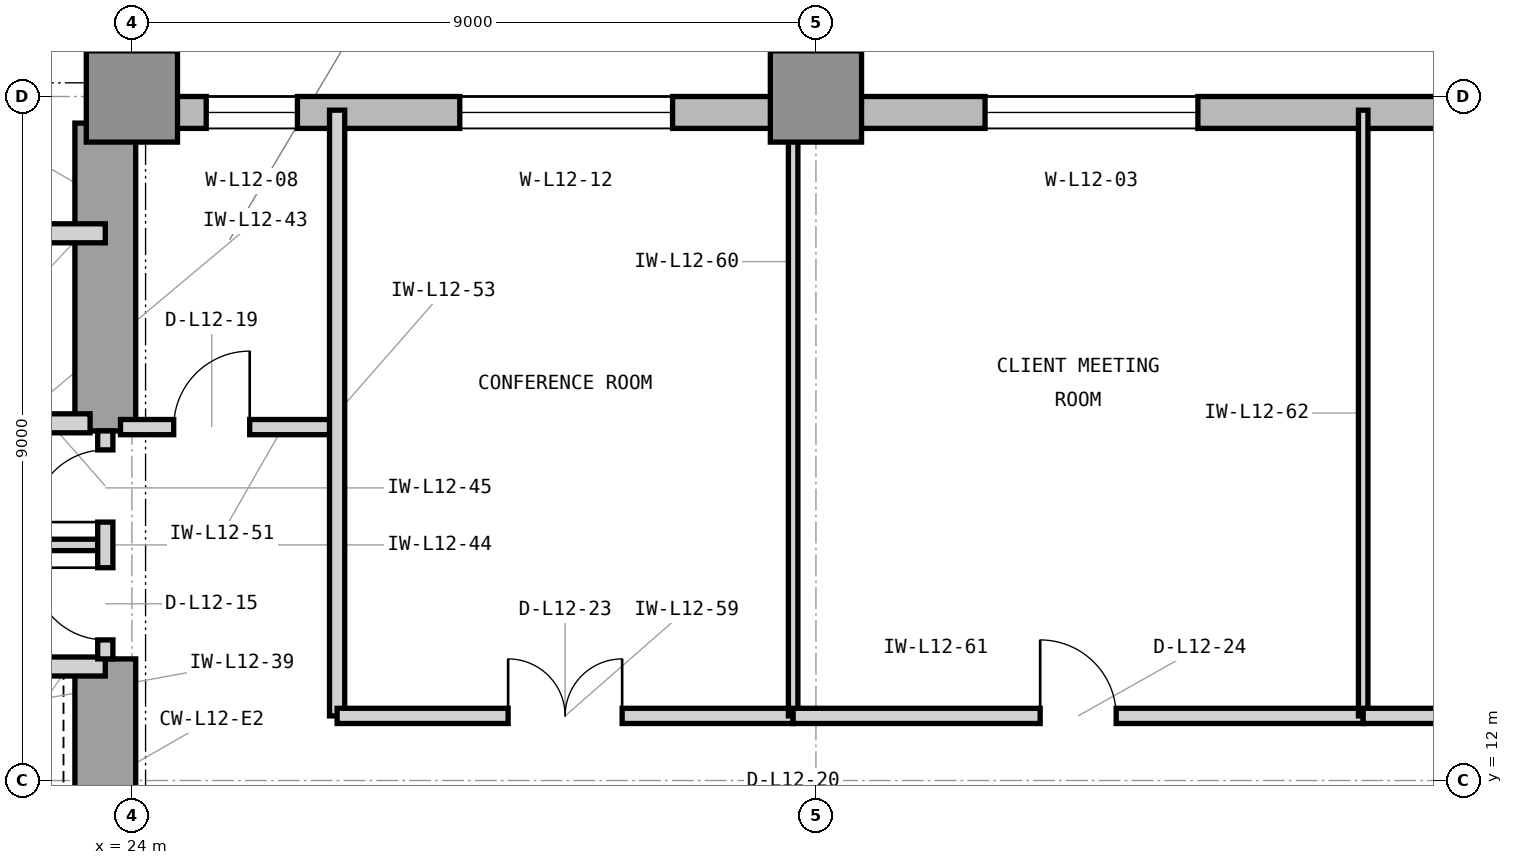
"""IFC4 building model, lengths in metres.
Left out: names, types, materials, properties, quantities, classifications, styles, units other than length and angle.
Written with IfcOpenShell. Run it as: python <this file> out.ifc"""

import sys

from ifc_helpers import new_model, si_unit, direction, frame, frame_2d, origin, origin_2d, place, context, subcontext, project, spatial, rectangle, extrude, element, fill, save


model = new_model("IFC4")
c1 = context("Model", 3, precision=1e-05, world=origin(), true_north=direction((0.0, 1.0)))
c2 = subcontext(c1, "Body", "Model", "MODEL_VIEW")
j1 = project(units=[si_unit("LENGTHUNIT", "METRE"), si_unit("PLANEANGLEUNIT", "RADIAN")], contexts=[c1])
p1 = place(None, origin())
s1 = spatial("IfcSite", under=j1, at=p1, CompositionType="ELEMENT")
p2 = place(p1, origin())
s2 = spatial("IfcBuilding", under=s1, at=p2, CompositionType="ELEMENT")
p3 = place(p2, frame((0.0, 0.0, 55.2)))
s3 = spatial("IfcBuildingStorey", under=s2, at=p3, CompositionType="ELEMENT", Elevation=55.2)
p4 = place(p3, frame((23.65, 10.4, 0.0), z_axis=(0.0, 0.0, 1.0), x_axis=(0.0, 1.0, 0.0)))
e1 = element("IfcWall", 1, at=p4, inside=s3, PredefinedType="SHEAR", context=c2, shape_type="SweptSolid", body=[
    extrude(rectangle(XDim=3.2, YDim=0.8, at=frame_2d((1.6, 0.0))), origin(), (0.0, 0.0, 1.0), 4.2),
])
p5 = place(p3, frame((23.65, 16.6, 0.0), z_axis=(0.0, 0.0, 1.0), x_axis=(0.0, 1.0, 0.0)))
e2 = element("IfcWall", 2, at=p5, inside=s3, PredefinedType="SHEAR", context=c2, shape_type="SweptSolid", body=[
    extrude(rectangle(XDim=4.05, YDim=0.8, at=frame_2d((2.025, 0.0))), origin(), (0.0, 0.0, 1.0), 4.2),
])
for number, where, z_axis, x_axis in (
    (3, (24.0, 21.0, 0.0), (0.0, 0.0, 1.0), (1.0, 0.0, 0.0)),
    (4, (33.0, 21.0, 0.0), (0.0, 0.0, 1.0), (1.0, 0.0, 0.0)),
):
    element("IfcColumn", number, at=place(p3, frame(where, z_axis=z_axis, x_axis=x_axis)), inside=s3, PredefinedType="COLUMN", context=c2, shape_type="SweptSolid", body=[
        extrude(rectangle(XDim=1.2, YDim=1.2, at=origin_2d()), origin(), (0.0, 0.0, 1.0), 4.2),
    ])
p6 = place(p3, frame((64.4, 20.79, 0.0), z_axis=(0.0, 0.0, 1.0), x_axis=(-1.0, 0.0, 0.0)))
e5 = element("IfcWall", 5, at=p6, inside=s3, PredefinedType="STANDARD", context=c2, shape_type="SweptSolid", body=[
    extrude(rectangle(XDim=40.4, YDim=0.42, at=frame_2d((20.2, 0.0))), origin(), (0.0, 0.0, 1.0), 3.98),
])
p7 = place(p6, frame((26.375, 0.0, 0.85)))
e6 = element("IfcOpeningElement", 6, at=p7, cuts=e5, PredefinedType="OPENING", context=c2, shape_type="SweptSolid", body=[
    extrude(rectangle(XDim=2.8, YDim=2.45, at=frame_2d((1.4, 1.225))), frame((0.0, 0.22, 0.0), z_axis=(0.0, -1.0, 0.0), x_axis=(1.0, 0.0, 0.0)), (0.0, 0.0, 1.0), 0.44),
])
p8 = place(p6, frame((38.222, 0.0, 0.85)))
e7 = element("IfcOpeningElement", 7, at=p8, cuts=e5, PredefinedType="OPENING", context=c2, shape_type="SweptSolid", body=[
    extrude(rectangle(XDim=1.2, YDim=2.45, at=frame_2d((0.6, 1.225))), frame((0.0, 0.22, 0.0), z_axis=(0.0, -1.0, 0.0), x_axis=(1.0, 0.0, 0.0)), (0.0, 0.0, 1.0), 0.44),
])
p9 = place(p6, frame((33.286, 0.0, 0.85)))
e8 = element("IfcOpeningElement", 8, at=p9, cuts=e5, PredefinedType="OPENING", context=c2, shape_type="SweptSolid", body=[
    extrude(rectangle(XDim=2.8, YDim=2.45, at=frame_2d((1.4, 1.225))), frame((0.0, 0.22, 0.0), z_axis=(0.0, -1.0, 0.0), x_axis=(1.0, 0.0, 0.0)), (0.0, 0.0, 1.0), 0.44),
])
p10 = place(p6, frame((18.636, 0.0, 0.85)))
e9 = element("IfcOpeningElement", 9, at=p10, cuts=e5, PredefinedType="OPENING", context=c2, shape_type="SweptSolid", body=[
    extrude(rectangle(XDim=2.8, YDim=2.45, at=frame_2d((1.4, 1.225))), frame((0.0, 0.22, 0.0), z_axis=(0.0, -1.0, 0.0), x_axis=(1.0, 0.0, 0.0)), (0.0, 0.0, 1.0), 0.44),
])
p11 = place(p6, frame((11.436, 0.0, 0.85)))
e10 = element("IfcOpeningElement", 10, at=p11, cuts=e5, PredefinedType="OPENING", context=c2, shape_type="SweptSolid", body=[
    extrude(rectangle(XDim=1.2, YDim=2.45, at=frame_2d((0.6, 1.225))), frame((0.0, 0.22, 0.0), z_axis=(0.0, -1.0, 0.0), x_axis=(1.0, 0.0, 0.0)), (0.0, 0.0, 1.0), 0.44),
])
p12 = place(p3, frame((23.79, 21.0, 0.0), z_axis=(0.0, 0.0, 1.0), x_axis=(0.0, 1.0, 0.0)))
e11 = element("IfcWall", 11, at=p12, inside=s3, PredefinedType="STANDARD", context=c2, shape_type="SweptSolid", body=[
    extrude(rectangle(XDim=28.4, YDim=0.42, at=frame_2d((14.2, 0.0))), origin(), (0.0, 0.0, 1.0), 3.98),
])
p13 = place(p12, frame((10.433, 0.0, 0.85)))
e12 = element("IfcOpeningElement", 12, at=p13, cuts=e11, PredefinedType="OPENING", context=c2, shape_type="SweptSolid", body=[
    extrude(rectangle(XDim=2.8, YDim=2.45, at=frame_2d((1.4, 1.225))), frame((0.0, 0.22, 0.0), z_axis=(0.0, -1.0, 0.0), x_axis=(1.0, 0.0, 0.0)), (0.0, 0.0, 1.0), 0.44),
])
p14 = place(p3, frame((21.05, 16.7, 0.0), z_axis=(0.0, 0.0, 1.0), x_axis=(1.0, 0.0, 0.0)))
e13 = element("IfcWall", 13, at=p14, inside=s3, PredefinedType="PARTITIONING", context=c2, shape_type="SweptSolid", body=[
    extrude(rectangle(XDim=2.4, YDim=0.25, at=frame_2d((1.2, 0.0))), origin(), (0.0, 0.0, 1.0), 3.426),
])
p15 = place(p3, frame((16.45, 19.2, 0.0), z_axis=(0.0, 0.0, 1.0), x_axis=(1.0, 0.0, 0.0)))
e14 = element("IfcWall", 14, at=p15, inside=s3, PredefinedType="PARTITIONING", context=c2, shape_type="SweptSolid", body=[
    extrude(rectangle(XDim=7.2, YDim=0.25, at=frame_2d((3.6, 0.0))), origin(), (0.0, 0.0, 1.0), 3.97),
])
p16 = place(p3, frame((14.7, 13.5, 0.0), z_axis=(0.0, 0.0, 1.0), x_axis=(1.0, 0.0, 0.0)))
e15 = element("IfcWall", 15, at=p16, inside=s3, PredefinedType="PARTITIONING", context=c2, shape_type="SweptSolid", body=[
    extrude(rectangle(XDim=8.95, YDim=0.25, at=frame_2d((4.475, 0.0))), origin(), (0.0, 0.0, 1.0), 3.426),
])
p17 = place(p3, frame((19.65, 15.1, 0.0), z_axis=(0.0, 0.0, 1.0), x_axis=(1.0, 0.0, 0.0)))
e16 = element("IfcWall", 16, at=p17, inside=s3, PredefinedType="PARTITIONING", context=c2, shape_type="SweptSolid", body=[
    extrude(rectangle(XDim=4.0, YDim=0.15, at=frame_2d((2.0, 0.0))), origin(), (0.0, 0.0, 1.0), 3.97),
])
p18 = place(p3, frame((23.65, 13.6, 0.0), z_axis=(0.0, 0.0, 1.0), x_axis=(0.0, 1.0, 0.0)))
e17 = element("IfcWall", 17, at=p18, inside=s3, PredefinedType="PARTITIONING", context=c2, shape_type="SweptSolid", body=[
    extrude(rectangle(XDim=3.0, YDim=0.2, at=frame_2d((1.5, 0.0))), origin(), (0.0, 0.0, 1.0), 3.97),
])
p19 = place(p18, frame((0.25, 0.0, 0.0)))
e18 = element("IfcOpeningElement", 18, at=p19, cuts=e17, PredefinedType="OPENING", context=c2, shape_type="SweptSolid", body=[
    extrude(rectangle(XDim=0.95, YDim=2.1, at=frame_2d((0.475, 1.05))), frame((0.0, 0.11, 0.0), z_axis=(0.0, -1.0, 0.0), x_axis=(1.0, 0.0, 0.0)), (0.0, 0.0, 1.0), 0.22),
])
p20 = place(p18, frame((1.8, 0.0, 0.0)))
e19 = element("IfcOpeningElement", 19, at=p20, cuts=e17, PredefinedType="OPENING", context=c2, shape_type="SweptSolid", body=[
    extrude(rectangle(XDim=0.95, YDim=2.1, at=frame_2d((0.475, 1.05))), frame((0.0, 0.11, 0.0), z_axis=(0.0, -1.0, 0.0), x_axis=(1.0, 0.0, 0.0)), (0.0, 0.0, 1.0), 0.22),
])
p21 = place(p3, frame((23.85, 16.65, 0.0), z_axis=(0.0, 0.0, 1.0), x_axis=(1.0, 0.0, 0.0)))
e20 = element("IfcWall", 20, at=p21, inside=s3, PredefinedType="PARTITIONING", context=c2, shape_type="SweptSolid", body=[
    extrude(rectangle(XDim=2.85, YDim=0.2, at=frame_2d((1.425, 0.0))), origin(), (0.0, 0.0, 1.0), 3.97),
])
p22 = place(p21, frame((0.7, 0.0, 0.0)))
e21 = element("IfcOpeningElement", 21, at=p22, cuts=e20, PredefinedType="OPENING", context=c2, shape_type="SweptSolid", body=[
    extrude(rectangle(XDim=1.0, YDim=2.15, at=frame_2d((0.5, 1.075))), frame((0.0, 0.11, 0.0), z_axis=(0.0, -1.0, 0.0), x_axis=(1.0, 0.0, 0.0)), (0.0, 0.0, 1.0), 0.22),
])
p23 = place(p3, frame((26.7, 12.85, 0.0), z_axis=(0.0, 0.0, 1.0), x_axis=(0.0, 1.0, 0.0)))
e22 = element("IfcWall", 22, at=p23, inside=s3, PredefinedType="PARTITIONING", context=c2, shape_type="SweptSolid", body=[
    extrude(rectangle(XDim=7.97, YDim=0.2, at=frame_2d((3.985, 0.0))), origin(), (0.0, 0.0, 1.0), 3.97),
])
p24 = place(p3, frame((26.7, 12.85, 0.0), z_axis=(0.0, 0.0, 1.0), x_axis=(1.0, 0.0, 0.0)))
e23 = element("IfcWall", 23, at=p24, inside=s3, PredefinedType="PARTITIONING", context=c2, shape_type="SweptSolid", body=[
    extrude(rectangle(XDim=6.0, YDim=0.2, at=frame_2d((3.0, 0.0))), origin(), (0.0, 0.0, 1.0), 3.97),
])
p25 = place(p24, frame((2.25, 0.0, 0.0)))
e24 = element("IfcOpeningElement", 24, at=p25, cuts=e23, PredefinedType="OPENING", context=c2, shape_type="SweptSolid", body=[
    extrude(rectangle(XDim=1.5, YDim=2.3, at=frame_2d((0.75, 1.15))), frame((0.0, 0.11, 0.0), z_axis=(0.0, -1.0, 0.0), x_axis=(1.0, 0.0, 0.0)), (0.0, 0.0, 1.0), 0.22),
])
p26 = place(p3, frame((32.7, 12.85, 0.0), z_axis=(0.0, 0.0, 1.0), x_axis=(0.0, 1.0, 0.0)))
e25 = element("IfcWall", 25, at=p26, inside=s3, PredefinedType="PARTITIONING", context=c2, shape_type="SweptSolid", body=[
    extrude(rectangle(XDim=7.97, YDim=0.125, at=frame_2d((3.985, 0.0))), origin(), (0.0, 0.0, 1.0), 3.97),
])
p27 = place(p3, frame((32.7, 12.85, 0.0), z_axis=(0.0, 0.0, 1.0), x_axis=(1.0, 0.0, 0.0)))
e26 = element("IfcWall", 26, at=p27, inside=s3, PredefinedType="PARTITIONING", context=c2, shape_type="SweptSolid", body=[
    extrude(rectangle(XDim=7.5, YDim=0.2, at=frame_2d((3.75, 0.0))), origin(), (0.0, 0.0, 1.0), 3.97),
])
p28 = place(p27, frame((3.25, 0.0, 0.0)))
e27 = element("IfcOpeningElement", 27, at=p28, cuts=e26, PredefinedType="OPENING", context=c2, shape_type="SweptSolid", body=[
    extrude(rectangle(XDim=1.0, YDim=2.15, at=frame_2d((0.5, 1.075))), frame((0.0, 0.11, 0.0), z_axis=(0.0, -1.0, 0.0), x_axis=(1.0, 0.0, 0.0)), (0.0, 0.0, 1.0), 0.22),
])
p29 = place(p3, frame((40.2, 12.85, 0.0), z_axis=(0.0, 0.0, 1.0), x_axis=(0.0, 1.0, 0.0)))
e28 = element("IfcWall", 28, at=p29, inside=s3, PredefinedType="PARTITIONING", context=c2, shape_type="SweptSolid", body=[
    extrude(rectangle(XDim=7.97, YDim=0.125, at=frame_2d((3.985, 0.0))), origin(), (0.0, 0.0, 1.0), 3.97),
])
p30 = place(p3, frame((40.2, 12.85, 0.0), z_axis=(0.0, 0.0, 1.0), x_axis=(1.0, 0.0, 0.0)))
e29 = element("IfcWall", 29, at=p30, inside=s3, PredefinedType="PARTITIONING", context=c2, shape_type="SweptSolid", body=[
    extrude(rectangle(XDim=7.5, YDim=0.2, at=frame_2d((3.75, 0.0))), origin(), (0.0, 0.0, 1.0), 3.97),
])
p31 = place(p30, frame((3.25, 0.0, 0.0)))
e30 = element("IfcOpeningElement", 30, at=p31, cuts=e29, PredefinedType="OPENING", context=c2, shape_type="SweptSolid", body=[
    extrude(rectangle(XDim=1.0, YDim=2.15, at=frame_2d((0.5, 1.075))), frame((0.0, 0.11, 0.0), z_axis=(0.0, -1.0, 0.0), x_axis=(1.0, 0.0, 0.0)), (0.0, 0.0, 1.0), 0.22),
])
p32 = place(p7, origin())
e31 = element("IfcWindow", 31, at=p32, inside=s3, PartitioningType="SINGLE_PANEL", PredefinedType="WINDOW", context=c2, shape_type="SweptSolid", body=[
    extrude(rectangle(XDim=2.8, YDim=2.45, at=frame_2d((1.4, 1.225))), frame((0.0, 0.11, 0.0), z_axis=(0.0, -1.0, 0.0), x_axis=(1.0, 0.0, 0.0)), (0.0, 0.0, 1.0), 0.06),
])
fill(e6, e31)
p33 = place(p19, origin())
e32 = element("IfcDoor", 32, at=p33, inside=s3, OperationType="SINGLE_SWING_RIGHT", PredefinedType="DOOR", context=c2, shape_type="SweptSolid", body=[
    extrude(rectangle(XDim=0.95, YDim=2.1, at=frame_2d((0.475, 1.05))), frame((0.0, 0.025, 0.0), z_axis=(0.0, -1.0, 0.0), x_axis=(1.0, 0.0, 0.0)), (0.0, 0.0, 1.0), 0.05),
])
fill(e18, e32)
p34 = place(p20, origin())
e33 = element("IfcDoor", 33, at=p34, inside=s3, OperationType="SINGLE_SWING_LEFT", PredefinedType="DOOR", context=c2, shape_type="SweptSolid", body=[
    extrude(rectangle(XDim=0.95, YDim=2.1, at=frame_2d((0.475, 1.05))), frame((0.0, 0.025, 0.0), z_axis=(0.0, -1.0, 0.0), x_axis=(1.0, 0.0, 0.0)), (0.0, 0.0, 1.0), 0.05),
])
fill(e19, e33)
p35 = place(p22, origin())
e34 = element("IfcDoor", 34, at=p35, inside=s3, OperationType="SINGLE_SWING_RIGHT", PredefinedType="DOOR", context=c2, shape_type="SweptSolid", body=[
    extrude(rectangle(XDim=1.0, YDim=2.15, at=frame_2d((0.5, 1.075))), frame((0.0, 0.025, 0.0), z_axis=(0.0, -1.0, 0.0), x_axis=(1.0, 0.0, 0.0)), (0.0, 0.0, 1.0), 0.05),
])
fill(e21, e34)
p36 = place(p25, origin())
e35 = element("IfcDoor", 35, at=p36, inside=s3, OperationType="DOUBLE_DOOR_SINGLE_SWING", PredefinedType="DOOR", context=c2, shape_type="SweptSolid", body=[
    extrude(rectangle(XDim=1.5, YDim=2.3, at=frame_2d((0.75, 1.15))), frame((0.0, 0.025, 0.0), z_axis=(0.0, -1.0, 0.0), x_axis=(1.0, 0.0, 0.0)), (0.0, 0.0, 1.0), 0.05),
])
fill(e24, e35)
p37 = place(p28, origin())
e36 = element("IfcDoor", 36, at=p37, inside=s3, OperationType="SINGLE_SWING_LEFT", PredefinedType="DOOR", context=c2, shape_type="SweptSolid", body=[
    extrude(rectangle(XDim=1.0, YDim=2.15, at=frame_2d((0.5, 1.075))), frame((0.0, 0.025, 0.0), z_axis=(0.0, -1.0, 0.0), x_axis=(1.0, 0.0, 0.0)), (0.0, 0.0, 1.0), 0.05),
])
fill(e27, e36)
p38 = place(p8, origin())
e37 = element("IfcWindow", 37, at=p38, inside=s3, PartitioningType="SINGLE_PANEL", PredefinedType="WINDOW", context=c2, shape_type="SweptSolid", body=[
    extrude(rectangle(XDim=1.2, YDim=2.45, at=frame_2d((0.6, 1.225))), frame((0.0, 0.11, 0.0), z_axis=(0.0, -1.0, 0.0), x_axis=(1.0, 0.0, 0.0)), (0.0, 0.0, 1.0), 0.06),
])
fill(e7, e37)
p39 = place(p9, origin())
e38 = element("IfcWindow", 38, at=p39, inside=s3, PartitioningType="SINGLE_PANEL", PredefinedType="WINDOW", context=c2, shape_type="SweptSolid", body=[
    extrude(rectangle(XDim=2.8, YDim=2.45, at=frame_2d((1.4, 1.225))), frame((0.0, 0.11, 0.0), z_axis=(0.0, -1.0, 0.0), x_axis=(1.0, 0.0, 0.0)), (0.0, 0.0, 1.0), 0.06),
])
fill(e8, e38)
save(model, sys.argv[1])
